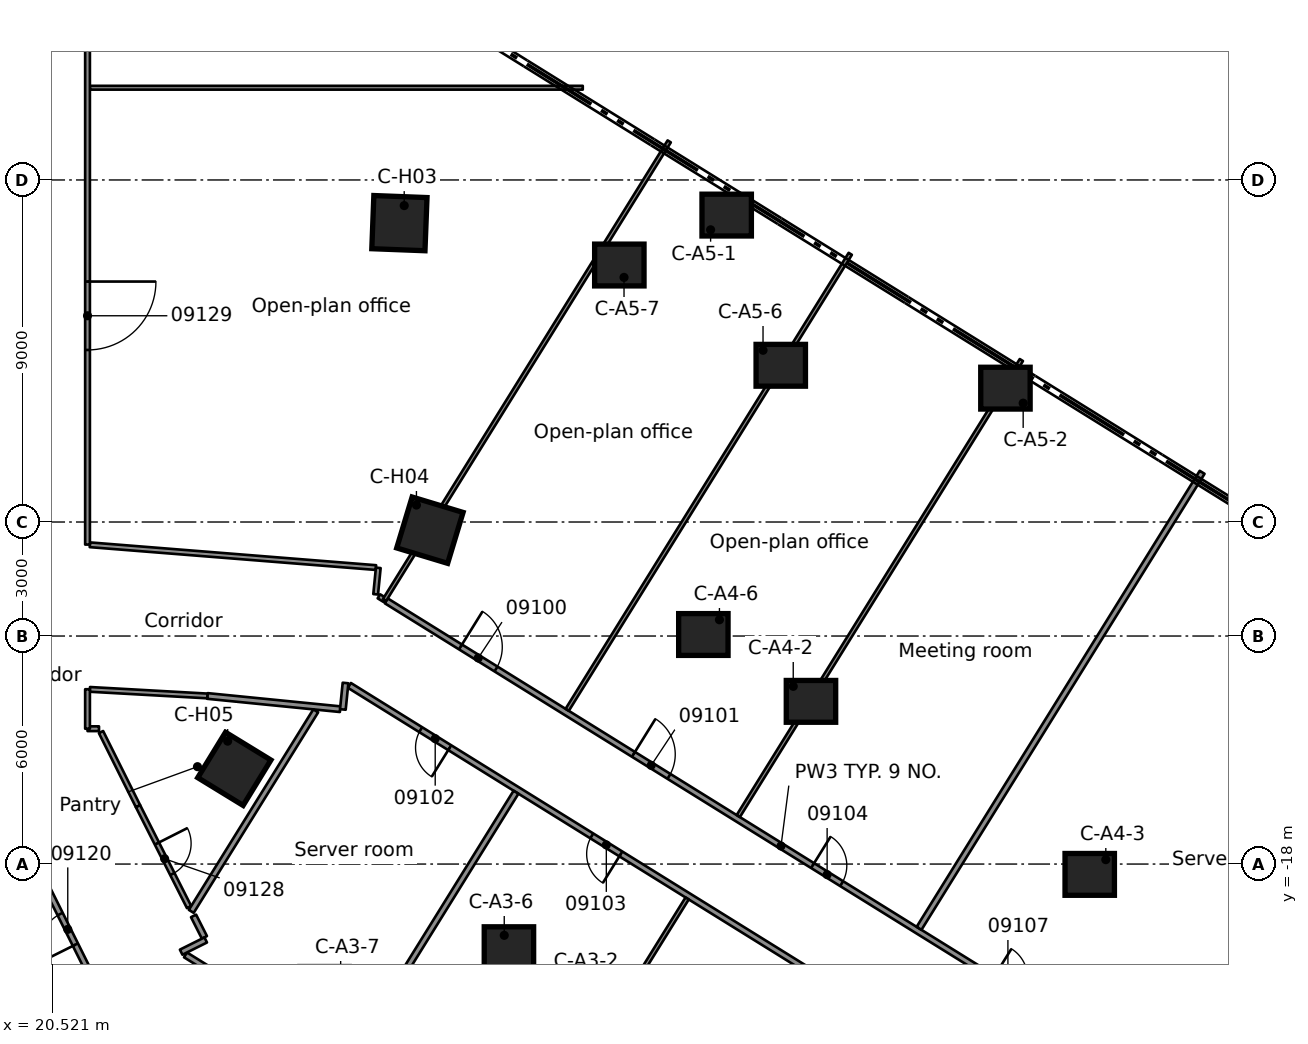
"""IFC4 building model, lengths in metres.
Left out: names, types, materials, properties, quantities, classifications, styles, units other than length and angle.
Written with IfcOpenShell. Run it as: python <this file> out.ifc"""

import sys

from ifc_helpers import new_model, si_unit, direction, frame, frame_2d, origin, origin_2d, place, context, subcontext, project, spatial, rectangle, extrude, element, fill, save


model = new_model("IFC4")
c1 = context("Model", 3, precision=1e-05, world=origin(), true_north=direction((0.0, 1.0)))
c2 = subcontext(c1, "Body", "Model", "MODEL_VIEW")
j1 = project(units=[si_unit("LENGTHUNIT", "METRE"), si_unit("PLANEANGLEUNIT", "RADIAN")], contexts=[c1])
p1 = place(None, origin())
s1 = spatial("IfcSite", under=j1, at=p1, CompositionType="ELEMENT")
p2 = place(p1, origin())
s2 = spatial("IfcBuilding", under=s1, at=p2, CompositionType="ELEMENT")
p3 = place(p2, frame((0.0, 0.0, 40.8)))
s3 = spatial("IfcBuildingStorey", under=s2, at=p3, CompositionType="ELEMENT", Elevation=40.8)
for number, where, z_axis, x_axis in (
    (1, (32.539, -20.201, 0.0), (0.0, 0.0, 1.0), (1.0, 0.0, 0.0)),
    (2, (40.487, -13.719, 0.0), (0.0, 0.0, 1.0), (1.0, 0.0, 0.0)),
    (3, (47.822, -18.272, 0.0), (0.0, 0.0, 1.0), (1.0, 0.0, 0.0)),
    (4, (37.655, -11.96, 0.0), (0.0, 0.0, 1.0), (1.0, 0.0, 0.0)),
    (5, (38.269, -0.924, 0.0), (0.0, 0.0, 1.0), (1.0, 0.0, 0.0)),
    (6, (45.604, -5.478, 0.0), (0.0, 0.0, 1.0), (1.0, 0.0, 0.0)),
    (7, (39.692, -4.876, 0.0), (0.0, 0.0, 1.0), (1.0, 0.0, 0.0)),
    (8, (35.444, -2.238, 0.0), (0.0, 0.0, 1.0), (1.0, 0.0, 0.0)),
):
    element("IfcColumn", number, at=place(p3, frame(where, z_axis=z_axis, x_axis=x_axis)), inside=s3, PredefinedType="COLUMN", context=c2, shape_type="SweptSolid", body=[
        extrude(rectangle(XDim=1.3, YDim=1.1, at=origin_2d()), origin(), (0.0, 0.0, 1.0), 3.5),
    ])
for number, where, z_axis, x_axis in (
    (9, (29.657, -1.136, 0.0), (0.0, 0.0, 1.0), (0.999, -0.038, 0.0)),
    (10, (30.459, -9.215, 0.0), (0.0, 0.0, 1.0), (0.957, -0.29, 0.0)),
    (11, (25.313, -15.495, 0.0), (0.0, 0.0, 1.0), (0.853, -0.522, 0.0)),
):
    element("IfcColumn", number, at=place(p3, frame(where, z_axis=z_axis, x_axis=x_axis)), inside=s3, PredefinedType="COLUMN", context=c2, shape_type="SweptSolid", body=[
        extrude(rectangle(XDim=1.4, YDim=1.4, at=origin_2d()), origin(), (0.0, 0.0, 1.0), 3.5),
    ])
p4 = place(p3, frame((21.957, -21.776, 0.0), z_axis=(0.0, 0.0, 1.0), x_axis=(-0.446609612261, 0.894728927797, 0.0)))
e12 = element("IfcWall", 12, at=p4, inside=s3, PredefinedType="PARTITIONING", context=c2, shape_type="SweptSolid", body=[
    extrude(rectangle(XDim=3.719, YDim=0.15, at=frame_2d((1.86, 0.0))), origin(), (0.0, 0.0, 1.0), 3.06),
])
p5 = place(p4, frame((1.85, 0.0, 0.0)))
e13 = element("IfcOpeningElement", 13, at=p5, cuts=e12, PredefinedType="OPENING", context=c2, shape_type="SweptSolid", body=[
    extrude(rectangle(XDim=0.9, YDim=2.1, at=frame_2d((0.45, 1.05))), frame((0.0, 0.085, 0.0), z_axis=(0.0, -1.0, 0.0), x_axis=(1.0, 0.0, 0.0)), (0.0, 0.0, 1.0), 0.17),
])
p6 = place(p3, frame((21.805, -14.527, 0.0), z_axis=(0.0, 0.0, 1.0), x_axis=(0.446720903114, -0.894673367616, 0.0)))
e14 = element("IfcWall", 14, at=p6, inside=s3, PredefinedType="PARTITIONING", context=c2, shape_type="SweptSolid", body=[
    extrude(rectangle(XDim=2.181, YDim=0.125, at=frame_2d((1.09, 0.0))), origin(), (0.0, 0.0, 1.0), 3.06),
])
p7 = place(p3, frame((24.24, -19.364, 0.0), z_axis=(0.0, 0.0, 1.0), x_axis=(0.451527001133, -0.892257455698, 0.0)))
e15 = element("IfcWall", 15, at=p7, inside=s3, PredefinedType="PARTITIONING", context=c2, shape_type="SweptSolid", body=[
    extrude(rectangle(XDim=0.633, YDim=0.15, at=frame_2d((0.316, 0.0))), origin(), (0.0, 0.0, 1.0), 3.06),
])
p8 = place(p3, frame((22.779, -16.478, 0.0), z_axis=(0.0, 0.0, 1.0), x_axis=(0.451638349486, -0.892201099121, 0.0)))
e16 = element("IfcWall", 16, at=p8, inside=s3, PredefinedType="PARTITIONING", context=c2, shape_type="SweptSolid", body=[
    extrude(rectangle(XDim=2.976, YDim=0.125, at=frame_2d((1.488, 0.0))), origin(), (0.0, 0.0, 1.0), 3.06),
])
p9 = place(p8, frame((1.1, 0.0, 0.0)))
e17 = element("IfcOpeningElement", 17, at=p9, cuts=e16, PredefinedType="OPENING", context=c2, shape_type="SweptSolid", body=[
    extrude(rectangle(XDim=0.9, YDim=2.1, at=frame_2d((0.45, 1.05))), frame((0.0, 0.073, 0.0), z_axis=(0.0, -1.0, 0.0), x_axis=(1.0, 0.0, 0.0)), (0.0, 0.0, 1.0), 0.145),
])
p10 = place(p3, frame((24.028, -20.39, 0.0), z_axis=(0.0, 0.0, 1.0), x_axis=(0.8496545068, -0.527339756775, 0.0)))
e18 = element("IfcWall", 18, at=p10, inside=s3, PredefinedType="PARTITIONING", context=c2, shape_type="SweptSolid", body=[
    extrude(rectangle(XDim=21.569, YDim=0.15, at=frame_2d((10.784, 0.0))), origin(), (0.0, 0.0, 1.0), 3.06),
])
p11 = place(p10, frame((15.532, 0.0, 0.0)))
e19 = element("IfcOpeningElement", 19, at=p11, cuts=e18, PredefinedType="OPENING", context=c2, shape_type="SweptSolid", body=[
    extrude(rectangle(XDim=0.9, YDim=2.1, at=frame_2d((0.45, 1.05))), frame((0.0, 0.085, 0.0), z_axis=(0.0, -1.0, 0.0), x_axis=(1.0, 0.0, 0.0)), (0.0, 0.0, 1.0), 0.17),
])
p12 = place(p3, frame((46.73, -24.716, 0.0), z_axis=(0.0, 0.0, 1.0), x_axis=(-0.849574284109, 0.527468990349, 0.0)))
e20 = element("IfcWall", 20, at=p12, inside=s3, PredefinedType="PARTITIONING", context=c2, shape_type="SweptSolid", body=[
    extrude(rectangle(XDim=21.645, YDim=0.15, at=frame_2d((10.822, 0.0))), origin(), (0.0, 0.0, 1.0), 3.06),
])
p13 = place(p12, frame((18.537, 0.0, 0.0)))
e21 = element("IfcOpeningElement", 21, at=p13, cuts=e20, PredefinedType="OPENING", context=c2, shape_type="SweptSolid", body=[
    extrude(rectangle(XDim=0.9, YDim=2.1, at=frame_2d((0.45, 1.05))), frame((0.0, 0.085, 0.0), z_axis=(0.0, -1.0, 0.0), x_axis=(1.0, 0.0, 0.0)), (0.0, 0.0, 1.0), 0.17),
])
p14 = place(p12, frame((13.237, 0.0, 0.0)))
e22 = element("IfcOpeningElement", 22, at=p14, cuts=e20, PredefinedType="OPENING", context=c2, shape_type="SweptSolid", body=[
    extrude(rectangle(XDim=0.9, YDim=2.1, at=frame_2d((0.45, 1.05))), frame((0.0, 0.085, 0.0), z_axis=(0.0, -1.0, 0.0), x_axis=(1.0, 0.0, 0.0)), (0.0, 0.0, 1.0), 0.17),
])
p15 = place(p3, frame((29.31, -11.074, 0.0), z_axis=(0.0, 0.0, 1.0), x_axis=(0.849545912719, -0.527514684329, 0.0)))
e23 = element("IfcWall", 23, at=p15, inside=s3, PredefinedType="PARTITIONING", context=c2, shape_type="SweptSolid", body=[
    extrude(rectangle(XDim=24.457, YDim=0.15, at=frame_2d((12.228, 0.0))), origin(), (0.0, 0.0, 1.0), 3.06),
])
p16 = place(p15, frame((2.3, 0.0, 0.0)))
e24 = element("IfcOpeningElement", 24, at=p16, cuts=e23, PredefinedType="OPENING", context=c2, shape_type="SweptSolid", body=[
    extrude(rectangle(XDim=1.1, YDim=2.1, at=frame_2d((0.55, 1.05))), frame((0.0, 0.085, 0.0), z_axis=(0.0, -1.0, 0.0), x_axis=(1.0, 0.0, 0.0)), (0.0, 0.0, 1.0), 0.17),
])
p17 = place(p15, frame((7.658, 0.0, 0.0)))
e25 = element("IfcOpeningElement", 25, at=p17, cuts=e23, PredefinedType="OPENING", context=c2, shape_type="SweptSolid", body=[
    extrude(rectangle(XDim=1.1, YDim=2.1, at=frame_2d((0.55, 1.05))), frame((0.0, 0.085, 0.0), z_axis=(0.0, -1.0, 0.0), x_axis=(1.0, 0.0, 0.0)), (0.0, 0.0, 1.0), 0.17),
])
p18 = place(p15, frame((13.207, 0.0, 0.0)))
e26 = element("IfcOpeningElement", 26, at=p18, cuts=e23, PredefinedType="OPENING", context=c2, shape_type="SweptSolid", body=[
    extrude(rectangle(XDim=0.9, YDim=2.1, at=frame_2d((0.45, 1.05))), frame((0.0, 0.085, 0.0), z_axis=(0.0, -1.0, 0.0), x_axis=(1.0, 0.0, 0.0)), (0.0, 0.0, 1.0), 0.17),
])
p19 = place(p15, frame((18.806, 0.0, 0.0)))
e27 = element("IfcOpeningElement", 27, at=p19, cuts=e23, PredefinedType="OPENING", context=c2, shape_type="SweptSolid", body=[
    extrude(rectangle(XDim=0.9, YDim=2.1, at=frame_2d((0.45, 1.05))), frame((0.0, 0.085, 0.0), z_axis=(0.0, -1.0, 0.0), x_axis=(1.0, 0.0, 0.0)), (0.0, 0.0, 1.0), 0.17),
])
p20 = place(p3, frame((29.117, -10.955, 0.0), z_axis=(0.0, 0.0, 1.0), x_axis=(0.851611075983, -0.524174184087, 0.0)))
e28 = element("IfcWall", 28, at=p20, inside=s3, PredefinedType="PARTITIONING", context=c2, shape_type="SweptSolid", body=[
    extrude(rectangle(XDim=0.177, YDim=0.125, at=frame_2d((0.089, 0.0))), origin(), (0.0, 0.0, 1.0), 3.06),
])
p21 = place(p3, frame((24.604, -13.577, 0.0), z_axis=(0.0, 0.0, 1.0), x_axis=(0.995072238477, -0.099152610724, 0.0)))
e29 = element("IfcWall", 29, at=p21, inside=s3, PredefinedType="PARTITIONING", context=c2, shape_type="SweptSolid", body=[
    extrude(rectangle(XDim=3.511, YDim=0.15, at=frame_2d((1.756, 0.0))), origin(), (0.0, 0.0, 1.0), 3.06),
])
p22 = place(p3, frame((24.604, -13.577, 0.0), z_axis=(0.0, 0.0, 1.0), x_axis=(-0.998441130735, 0.055814948327, 0.0)))
e30 = element("IfcWall", 30, at=p22, inside=s3, PredefinedType="PARTITIONING", context=c2, shape_type="SweptSolid", body=[
    extrude(rectangle(XDim=3.097, YDim=0.125, at=frame_2d((1.548, 0.0))), origin(), (0.0, 0.0, 1.0), 3.06),
])
p23 = place(p3, frame((29.04, -10.199, 0.0), z_axis=(0.0, 0.0, 1.0), x_axis=(-0.996840412967, 0.079430416561, 0.0)))
e31 = element("IfcWall", 31, at=p23, inside=s3, PredefinedType="PARTITIONING", context=c2, shape_type="SweptSolid", body=[
    extrude(rectangle(XDim=7.552, YDim=0.125, at=frame_2d((3.776, 0.0))), origin(), (0.0, 0.0, 1.0), 3.06),
])
p24 = place(p3, frame((21.45, -14.439, 0.0), z_axis=(0.0, 0.0, 1.0), x_axis=(1.0, 0.0, 0.0)))
e32 = element("IfcWall", 32, at=p24, inside=s3, PredefinedType="PARTITIONING", context=c2, shape_type="SweptSolid", body=[
    extrude(rectangle(XDim=0.302, YDim=0.125, at=frame_2d((0.151, 0.0))), origin(), (0.0, 0.0, 1.0), 3.06),
])
p25 = place(p3, frame((21.512, 2.427, 0.0), z_axis=(0.0, 0.0, 1.0), x_axis=(1.0, 0.0, 0.0)))
e33 = element("IfcWall", 33, at=p25, inside=s3, PredefinedType="PARTITIONING", context=c2, shape_type="SweptSolid", body=[
    extrude(rectangle(XDim=12.97, YDim=0.1, at=frame_2d((6.485, 0.0))), origin(), (0.0, 0.0, 1.0), 3.06),
])
p26 = place(p3, frame((23.914, -20.319, 0.0), z_axis=(0.0, 0.0, 1.0), x_axis=(0.894967710853, 0.4461309186, 0.0)))
e34 = element("IfcWall", 34, at=p26, inside=s3, PredefinedType="PARTITIONING", context=c2, shape_type="SweptSolid", body=[
    extrude(rectangle(XDim=0.722, YDim=0.15, at=frame_2d((0.361, 0.0))), origin(), (0.0, 0.0, 1.0), 3.06),
])
p27 = place(p3, frame((43.331, -19.691, 0.0), z_axis=(0.0, 0.0, 1.0), x_axis=(0.527429557997, 0.849598764919, 0.0)))
e35 = element("IfcWall", 35, at=p27, inside=s3, PredefinedType="PARTITIONING", context=c2, shape_type="SweptSolid", body=[
    extrude(rectangle(XDim=14.123, YDim=0.15, at=frame_2d((7.062, 0.0))), origin(), (0.0, 0.0, 1.0), 3.06),
])
p28 = place(p3, frame((32.931, -25.828, 0.0), z_axis=(0.0, 0.0, 1.0), x_axis=(0.527378524743, 0.849630444158, 0.0)))
e36 = element("IfcWall", 36, at=p28, inside=s3, PredefinedType="PARTITIONING", context=c2, shape_type="SweptSolid", body=[
    extrude(rectangle(XDim=8.148, YDim=0.1, at=frame_2d((4.074, 0.0))), origin(), (0.0, 0.0, 1.0), 3.06),
])
p29 = place(p3, frame((38.574, -16.737, 0.0), z_axis=(0.0, 0.0, 1.0), x_axis=(0.527429557997, 0.849598764919, 0.0)))
e37 = element("IfcWall", 37, at=p29, inside=s3, PredefinedType="PARTITIONING", context=c2, shape_type="SweptSolid", body=[
    extrude(rectangle(XDim=14.123, YDim=0.1, at=frame_2d((7.062, 0.0))), origin(), (0.0, 0.0, 1.0), 3.06),
])
p30 = place(p3, frame((28.428, -23.032, 0.0), z_axis=(0.0, 0.0, 1.0), x_axis=(0.527432232041, 0.84959710487, 0.0)))
e38 = element("IfcWall", 38, at=p30, inside=s3, PredefinedType="PARTITIONING", context=c2, shape_type="SweptSolid", body=[
    extrude(rectangle(XDim=8.147, YDim=0.15, at=frame_2d((4.074, 0.0))), origin(), (0.0, 0.0, 1.0), 3.06),
])
p31 = place(p3, frame((34.072, -13.942, 0.0), z_axis=(0.0, 0.0, 1.0), x_axis=(0.527437304247, 0.84959395601, 0.0)))
e39 = element("IfcWall", 39, at=p31, inside=s3, PredefinedType="PARTITIONING", context=c2, shape_type="SweptSolid", body=[
    extrude(rectangle(XDim=14.123, YDim=0.1, at=frame_2d((7.062, 0.0))), origin(), (0.0, 0.0, 1.0), 3.06),
])
p32 = place(p3, frame((24.18, -19.245, 0.0), z_axis=(0.0, 0.0, 1.0), x_axis=(0.527399070795, 0.849617690567, 0.0)))
e40 = element("IfcWall", 40, at=p32, inside=s3, PredefinedType="PARTITIONING", context=c2, shape_type="SweptSolid", body=[
    extrude(rectangle(XDim=6.21, YDim=0.15, at=frame_2d((3.105, 0.0))), origin(), (0.0, 0.0, 1.0), 3.06),
])
p33 = place(p3, frame((29.268, -11.048, 0.0), z_axis=(0.0, 0.0, 1.0), x_axis=(0.527446323462, 0.849588356716, 0.0)))
e41 = element("IfcWall", 41, at=p33, inside=s3, PredefinedType="PARTITIONING", context=c2, shape_type="SweptSolid", body=[
    extrude(rectangle(XDim=14.199, YDim=0.1, at=frame_2d((7.099, 0.0))), origin(), (0.0, 0.0, 1.0), 3.06),
])
p34 = place(p3, frame((29.032, -10.902, 0.0), z_axis=(0.0, 0.0, 1.0), x_axis=(0.098777968406, 0.995109497974, 0.0)))
e42 = element("IfcWall", 42, at=p34, inside=s3, PredefinedType="PARTITIONING", context=c2, shape_type="SweptSolid", body=[
    extrude(rectangle(XDim=0.699, YDim=0.125, at=frame_2d((0.35, 0.0))), origin(), (0.0, 0.0, 1.0), 3.06),
])
p35 = place(p3, frame((28.169, -13.932, 0.0), z_axis=(0.0, 0.0, 1.0), x_axis=(0.100195004938, 0.99496781907, 0.0)))
e43 = element("IfcWall", 43, at=p35, inside=s3, PredefinedType="PARTITIONING", context=c2, shape_type="SweptSolid", body=[
    extrude(rectangle(XDim=0.699, YDim=0.15, at=frame_2d((0.35, 0.0))), origin(), (0.0, 0.0, 1.0), 3.06),
])
p36 = place(p3, frame((21.45, -14.439, 0.0), z_axis=(0.0, 0.0, 1.0), x_axis=(0.0, 1.0, 0.0)))
e44 = element("IfcWall", 44, at=p36, inside=s3, PredefinedType="PARTITIONING", context=c2, shape_type="SweptSolid", body=[
    extrude(rectangle(XDim=1.039, YDim=0.125, at=frame_2d((0.52, 0.0))), origin(), (0.0, 0.0, 1.0), 3.06),
])
p37 = place(p3, frame((21.45, 14.451, 0.0), z_axis=(0.0, 0.0, 1.0), x_axis=(0.0, -1.0, 0.0)))
e45 = element("IfcWall", 45, at=p37, inside=s3, PredefinedType="PARTITIONING", context=c2, shape_type="SweptSolid", body=[
    extrude(rectangle(XDim=24.045, YDim=0.125, at=frame_2d((12.022, 0.0))), origin(), (0.0, 0.0, 1.0), 3.06),
])
p38 = place(p37, frame((17.124, 0.0, 0.0)))
e46 = element("IfcOpeningElement", 46, at=p38, cuts=e45, PredefinedType="OPENING", context=c2, shape_type="SweptSolid", body=[
    extrude(rectangle(XDim=1.8, YDim=2.1, at=frame_2d((0.9, 1.05))), frame((0.0, 0.073, 0.0), z_axis=(0.0, -1.0, 0.0), x_axis=(1.0, 0.0, 0.0)), (0.0, 0.0, 1.0), 0.145),
])
p39 = place(p37, frame((5.1, 0.0, 0.0)))
e47 = element("IfcOpeningElement", 47, at=p39, cuts=e45, PredefinedType="OPENING", context=c2, shape_type="SweptSolid", body=[
    extrude(rectangle(XDim=1.8, YDim=2.1, at=frame_2d((0.9, 1.05))), frame((0.0, 0.073, 0.0), z_axis=(0.0, -1.0, 0.0), x_axis=(1.0, 0.0, 0.0)), (0.0, 0.0, 1.0), 0.145),
])
p40 = place(p16, origin())
e48 = element("IfcDoor", 48, at=p40, inside=s3, OperationType="SINGLE_SWING_LEFT", PredefinedType="DOOR", context=c2, shape_type="SweptSolid", body=[
    extrude(rectangle(XDim=1.1, YDim=2.1, at=frame_2d((0.55, 1.05))), frame((0.0, 0.025, 0.0), z_axis=(0.0, -1.0, 0.0), x_axis=(1.0, 0.0, 0.0)), (0.0, 0.0, 1.0), 0.05),
])
fill(e24, e48)
p41 = place(p17, origin())
e49 = element("IfcDoor", 49, at=p41, inside=s3, OperationType="SINGLE_SWING_LEFT", PredefinedType="DOOR", context=c2, shape_type="SweptSolid", body=[
    extrude(rectangle(XDim=1.1, YDim=2.1, at=frame_2d((0.55, 1.05))), frame((0.0, 0.025, 0.0), z_axis=(0.0, -1.0, 0.0), x_axis=(1.0, 0.0, 0.0)), (0.0, 0.0, 1.0), 0.05),
])
fill(e25, e49)
p42 = place(p13, origin())
e50 = element("IfcDoor", 50, at=p42, inside=s3, OperationType="SINGLE_SWING_RIGHT", PredefinedType="DOOR", context=c2, shape_type="SweptSolid", body=[
    extrude(rectangle(XDim=0.9, YDim=2.1, at=frame_2d((0.45, 1.05))), frame((0.0, 0.025, 0.0), z_axis=(0.0, -1.0, 0.0), x_axis=(1.0, 0.0, 0.0)), (0.0, 0.0, 1.0), 0.05),
])
fill(e21, e50)
p43 = place(p14, origin())
e51 = element("IfcDoor", 51, at=p43, inside=s3, OperationType="SINGLE_SWING_RIGHT", PredefinedType="DOOR", context=c2, shape_type="SweptSolid", body=[
    extrude(rectangle(XDim=0.9, YDim=2.1, at=frame_2d((0.45, 1.05))), frame((0.0, 0.025, 0.0), z_axis=(0.0, -1.0, 0.0), x_axis=(1.0, 0.0, 0.0)), (0.0, 0.0, 1.0), 0.05),
])
fill(e22, e51)
p44 = place(p18, origin())
e52 = element("IfcDoor", 52, at=p44, inside=s3, OperationType="SINGLE_SWING_RIGHT", PredefinedType="DOOR", context=c2, shape_type="SweptSolid", body=[
    extrude(rectangle(XDim=0.9, YDim=2.1, at=frame_2d((0.45, 1.05))), frame((0.0, 0.025, 0.0), z_axis=(0.0, -1.0, 0.0), x_axis=(1.0, 0.0, 0.0)), (0.0, 0.0, 1.0), 0.05),
])
fill(e26, e52)
p45 = place(p5, origin())
e53 = element("IfcDoor", 53, at=p45, inside=s3, OperationType="SINGLE_SWING_RIGHT", PredefinedType="DOOR", context=c2, shape_type="SweptSolid", body=[
    extrude(rectangle(XDim=0.9, YDim=2.1, at=frame_2d((0.45, 1.05))), frame((0.0, 0.025, 0.0), z_axis=(0.0, -1.0, 0.0), x_axis=(1.0, 0.0, 0.0)), (0.0, 0.0, 1.0), 0.05),
])
fill(e13, e53)
p46 = place(p9, origin())
e54 = element("IfcDoor", 54, at=p46, inside=s3, OperationType="SINGLE_SWING_RIGHT", PredefinedType="DOOR", context=c2, shape_type="SweptSolid", body=[
    extrude(rectangle(XDim=0.9, YDim=2.1, at=frame_2d((0.45, 1.05))), frame((0.0, 0.025, 0.0), z_axis=(0.0, -1.0, 0.0), x_axis=(1.0, 0.0, 0.0)), (0.0, 0.0, 1.0), 0.05),
])
fill(e17, e54)
p47 = place(p38, origin())
e55 = element("IfcDoor", 55, at=p47, inside=s3, OperationType="DOUBLE_DOOR_SINGLE_SWING", PredefinedType="DOOR", context=c2, shape_type="SweptSolid", body=[
    extrude(rectangle(XDim=1.8, YDim=2.1, at=frame_2d((0.9, 1.05))), frame((0.0, 0.025, 0.0), z_axis=(0.0, -1.0, 0.0), x_axis=(1.0, 0.0, 0.0)), (0.0, 0.0, 1.0), 0.05),
])
fill(e46, e55)
save(model, sys.argv[1])
